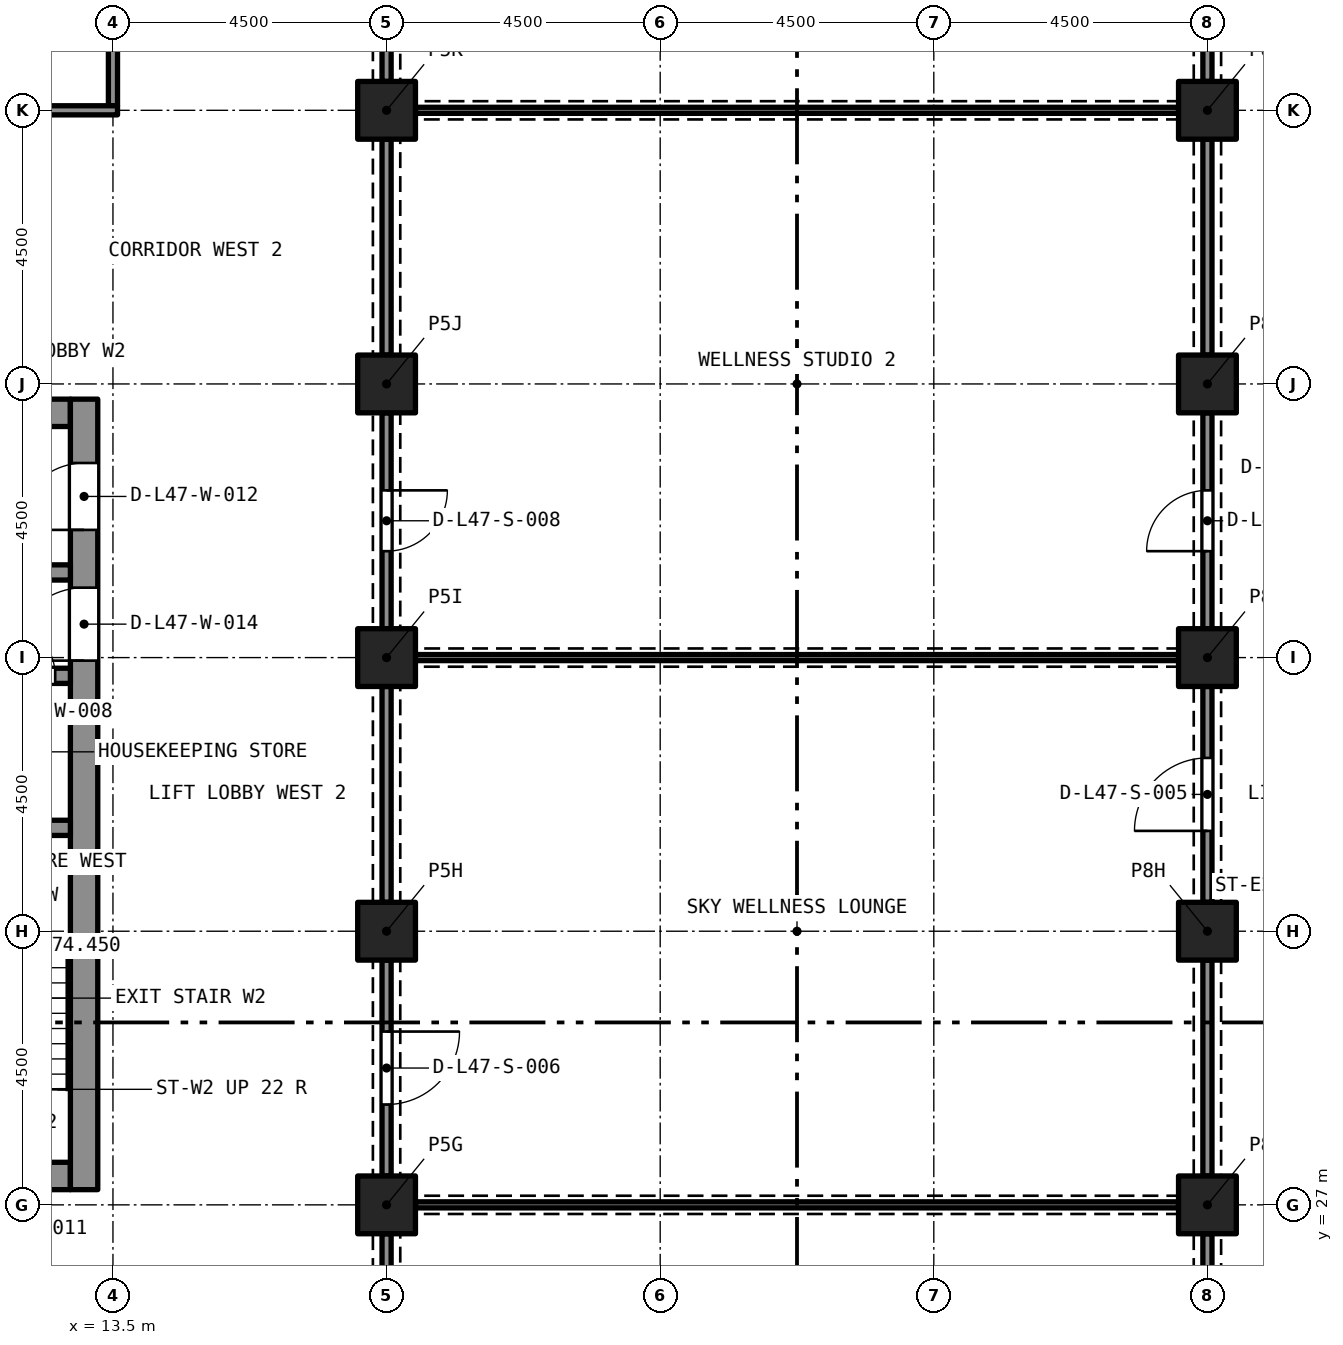
"""IFC4 building model, lengths in metres.
Left out: names, types, materials, properties, quantities, classifications, styles, units other than length and angle.
Written with IfcOpenShell. Run it as: python <this file> out.ifc"""

import sys

from ifc_helpers import new_model, si_unit, direction, frame, frame_2d, origin, origin_2d, place, context, subcontext, project, spatial, rectangle, extrude, element, fill, save


model = new_model("IFC4")
c1 = context("Model", 3, precision=1e-05, world=origin(), true_north=direction((0.0, 1.0)))
c2 = subcontext(c1, "Body", "Model", "MODEL_VIEW")
j1 = project(units=[si_unit("LENGTHUNIT", "METRE"), si_unit("PLANEANGLEUNIT", "RADIAN")], contexts=[c1])
p1 = place(None, origin())
s1 = spatial("IfcSite", under=j1, at=p1, CompositionType="ELEMENT")
p2 = place(p1, origin())
s2 = spatial("IfcBuilding", under=s1, at=p2, CompositionType="ELEMENT")
p3 = place(p2, frame((0.0, 0.0, 172.6)))
s3 = spatial("IfcBuildingStorey", under=s2, at=p3, CompositionType="ELEMENT", Elevation=172.6)
for number, where, z_axis, x_axis in (
    (1, (18.0, 27.0, 0.0), (0.0, 0.0, 1.0), (1.0, 0.0, 0.0)),
    (2, (31.5, 27.0, 0.0), (0.0, 0.0, 1.0), (1.0, 0.0, 0.0)),
    (3, (18.0, 31.5, 0.0), (0.0, 0.0, 1.0), (1.0, 0.0, 0.0)),
    (4, (31.5, 31.5, 0.0), (0.0, 0.0, 1.0), (1.0, 0.0, 0.0)),
    (5, (18.0, 36.0, 0.0), (0.0, 0.0, 1.0), (1.0, 0.0, 0.0)),
    (6, (31.5, 36.0, 0.0), (0.0, 0.0, 1.0), (1.0, 0.0, 0.0)),
    (7, (18.0, 40.5, 0.0), (0.0, 0.0, 1.0), (1.0, 0.0, 0.0)),
    (8, (31.5, 40.5, 0.0), (0.0, 0.0, 1.0), (1.0, 0.0, 0.0)),
    (9, (18.0, 45.0, 0.0), (0.0, 0.0, 1.0), (1.0, 0.0, 0.0)),
    (10, (31.5, 45.0, 0.0), (0.0, 0.0, 1.0), (1.0, 0.0, 0.0)),
):
    element("IfcColumn", number, at=place(p3, frame(where, z_axis=z_axis, x_axis=x_axis)), inside=s3, PredefinedType="COLUMN", context=c2, shape_type="SweptSolid", body=[
        extrude(rectangle(XDim=0.95, YDim=0.95, at=origin_2d()), origin(), (0.0, 0.0, 1.0), 3.7),
    ])
p4 = place(p3, frame((5.2, 27.475, 0.0), z_axis=(0.0, 0.0, 1.0), x_axis=(1.0, 0.0, 0.0)))
e11 = element("IfcWall", 11, at=p4, inside=s3, PredefinedType="SOLIDWALL", context=c2, shape_type="SweptSolid", body=[
    extrude(rectangle(XDim=7.6, YDim=0.45, at=frame_2d((3.8, 0.0))), origin(), (0.0, 0.0, 1.0), 3.7),
])
p5 = place(p4, frame((0.725, 0.0, 0.0)))
e12 = element("IfcOpeningElement", 12, at=p5, cuts=e11, PredefinedType="OPENING", context=c2, shape_type="SweptSolid", body=[
    extrude(rectangle(XDim=1.1, YDim=2.1, at=frame_2d((0.55, 1.05))), frame((0.0, 0.235, 0.0), z_axis=(0.0, -1.0, 0.0), x_axis=(1.0, 0.0, 0.0)), (0.0, 0.0, 1.0), 0.47),
])
p6 = place(p4, frame((3.25, 0.0, 0.0)))
e13 = element("IfcOpeningElement", 13, at=p6, cuts=e11, PredefinedType="OPENING", context=c2, shape_type="SweptSolid", body=[
    extrude(rectangle(XDim=1.1, YDim=2.1, at=frame_2d((0.55, 1.05))), frame((0.0, 0.235, 0.0), z_axis=(0.0, -1.0, 0.0), x_axis=(1.0, 0.0, 0.0)), (0.0, 0.0, 1.0), 0.47),
])
p7 = place(p4, frame((5.775, 0.0, 0.0)))
e14 = element("IfcOpeningElement", 14, at=p7, cuts=e11, PredefinedType="OPENING", context=c2, shape_type="SweptSolid", body=[
    extrude(rectangle(XDim=1.1, YDim=2.1, at=frame_2d((0.55, 1.05))), frame((0.0, 0.235, 0.0), z_axis=(0.0, -1.0, 0.0), x_axis=(1.0, 0.0, 0.0)), (0.0, 0.0, 1.0), 0.47),
])
p8 = place(p3, frame((5.2, 40.025, 0.0), z_axis=(0.0, 0.0, 1.0), x_axis=(1.0, 0.0, 0.0)))
e15 = element("IfcWall", 15, at=p8, inside=s3, PredefinedType="SOLIDWALL", context=c2, shape_type="SweptSolid", body=[
    extrude(rectangle(XDim=7.6, YDim=0.45, at=frame_2d((3.8, 0.0))), origin(), (0.0, 0.0, 1.0), 3.7),
])
p9 = place(p3, frame((13.025, 27.25, 0.0), z_axis=(0.0, 0.0, 1.0), x_axis=(0.0, 1.0, 0.0)))
e16 = element("IfcWall", 16, at=p9, inside=s3, PredefinedType="SOLIDWALL", context=c2, shape_type="SweptSolid", body=[
    extrude(rectangle(XDim=13.0, YDim=0.45, at=frame_2d((6.5, 0.0))), origin(), (0.0, 0.0, 1.0), 3.7),
])
p10 = place(p9, frame((10.85, 0.0, 0.0)))
e17 = element("IfcOpeningElement", 17, at=p10, cuts=e16, PredefinedType="OPENING", context=c2, shape_type="SweptSolid", body=[
    extrude(rectangle(XDim=1.1, YDim=2.1, at=frame_2d((0.55, 1.05))), frame((0.0, 0.235, 0.0), z_axis=(0.0, -1.0, 0.0), x_axis=(1.0, 0.0, 0.0)), (0.0, 0.0, 1.0), 0.47),
])
p11 = place(p9, frame((8.7, 0.0, 0.0)))
e18 = element("IfcOpeningElement", 18, at=p11, cuts=e16, PredefinedType="OPENING", context=c2, shape_type="SweptSolid", body=[
    extrude(rectangle(XDim=1.2, YDim=2.1, at=frame_2d((0.6, 1.05))), frame((0.0, 0.235, 0.0), z_axis=(0.0, -1.0, 0.0), x_axis=(1.0, 0.0, 0.0)), (0.0, 0.0, 1.0), 0.47),
])
p12 = place(p3, frame((5.2, 33.2, 0.0), z_axis=(0.0, 0.0, 1.0), x_axis=(1.0, 0.0, 0.0)))
e19 = element("IfcWall", 19, at=p12, inside=s3, PredefinedType="SOLIDWALL", context=c2, shape_type="SweptSolid", body=[
    extrude(rectangle(XDim=7.6, YDim=0.25, at=frame_2d((3.8, 0.0))), origin(), (0.0, 0.0, 1.0), 3.4),
])
p13 = place(p12, frame((3.3, 0.0, 0.0)))
e20 = element("IfcOpeningElement", 20, at=p13, cuts=e19, PredefinedType="OPENING", context=c2, shape_type="SweptSolid", body=[
    extrude(rectangle(XDim=1.0, YDim=2.1, at=frame_2d((0.5, 1.05))), frame((0.0, 0.135, 0.0), z_axis=(0.0, -1.0, 0.0), x_axis=(1.0, 0.0, 0.0)), (0.0, 0.0, 1.0), 0.27),
])
p14 = place(p3, frame((5.2, 35.7, 0.0), z_axis=(0.0, 0.0, 1.0), x_axis=(1.0, 0.0, 0.0)))
e21 = element("IfcWall", 21, at=p14, inside=s3, PredefinedType="SOLIDWALL", context=c2, shape_type="SweptSolid", body=[
    extrude(rectangle(XDim=7.6, YDim=0.25, at=frame_2d((3.8, 0.0))), origin(), (0.0, 0.0, 1.0), 3.4),
])
p15 = place(p14, frame((0.725, 0.0, 0.0)))
e22 = element("IfcOpeningElement", 22, at=p15, cuts=e21, PredefinedType="OPENING", context=c2, shape_type="SweptSolid", body=[
    extrude(rectangle(XDim=1.1, YDim=2.4, at=frame_2d((0.55, 1.2))), frame((0.0, 0.135, 0.0), z_axis=(0.0, -1.0, 0.0), x_axis=(1.0, 0.0, 0.0)), (0.0, 0.0, 1.0), 0.27),
])
p16 = place(p14, frame((5.125, 0.0, 0.0)))
e23 = element("IfcOpeningElement", 23, at=p16, cuts=e21, PredefinedType="OPENING", context=c2, shape_type="SweptSolid", body=[
    extrude(rectangle(XDim=0.8, YDim=2.1, at=frame_2d((0.4, 1.05))), frame((0.0, 0.135, 0.0), z_axis=(0.0, -1.0, 0.0), x_axis=(1.0, 0.0, 0.0)), (0.0, 0.0, 1.0), 0.27),
])
p17 = place(p14, frame((6.45, 0.0, 0.0)))
e24 = element("IfcOpeningElement", 24, at=p17, cuts=e21, PredefinedType="OPENING", context=c2, shape_type="SweptSolid", body=[
    extrude(rectangle(XDim=0.9, YDim=2.1, at=frame_2d((0.45, 1.05))), frame((0.0, 0.135, 0.0), z_axis=(0.0, -1.0, 0.0), x_axis=(1.0, 0.0, 0.0)), (0.0, 0.0, 1.0), 0.27),
])
p18 = place(p3, frame((5.2, 37.4, 0.0), z_axis=(0.0, 0.0, 1.0), x_axis=(1.0, 0.0, 0.0)))
e25 = element("IfcWall", 25, at=p18, inside=s3, PredefinedType="SOLIDWALL", context=c2, shape_type="SweptSolid", body=[
    extrude(rectangle(XDim=7.6, YDim=0.25, at=frame_2d((3.8, 0.0))), origin(), (0.0, 0.0, 1.0), 3.4),
])
p19 = place(p18, frame((0.7, 0.0, 0.0)))
e26 = element("IfcOpeningElement", 26, at=p19, cuts=e25, PredefinedType="OPENING", context=c2, shape_type="SweptSolid", body=[
    extrude(rectangle(XDim=1.1, YDim=2.4, at=frame_2d((0.55, 1.2))), frame((0.0, 0.135, 0.0), z_axis=(0.0, -1.0, 0.0), x_axis=(1.0, 0.0, 0.0)), (0.0, 0.0, 1.0), 0.27),
])
p20 = place(p3, frame((18.475, 27.0, 0.0), z_axis=(0.0, 0.0, 1.0), x_axis=(1.0, 0.0, 0.0)))
e27 = element("IfcWall", 27, at=p20, inside=s3, PredefinedType="PARTITIONING", context=c2, shape_type="SweptSolid", body=[
    extrude(rectangle(XDim=12.55, YDim=0.1, at=frame_2d((6.275, 0.0))), origin(), (0.0, 0.0, 1.0), 3.25),
])
p21 = place(p3, frame((31.5, 22.975, 0.0), z_axis=(0.0, 0.0, 1.0), x_axis=(0.0, 1.0, 0.0)))
e28 = element("IfcWall", 28, at=p21, inside=s3, PredefinedType="PARTITIONING", context=c2, shape_type="SweptSolid", body=[
    extrude(rectangle(XDim=3.55, YDim=0.15, at=frame_2d((1.775, 0.0))), origin(), (0.0, 0.0, 1.0), 2.88),
])
p22 = place(p21, frame((1.275, 0.0, 0.0)))
e29 = element("IfcOpeningElement", 29, at=p22, cuts=e28, PredefinedType="OPENING", context=c2, shape_type="SweptSolid", body=[
    extrude(rectangle(XDim=1.0, YDim=2.1, at=frame_2d((0.5, 1.05))), frame((0.0, 0.085, 0.0), z_axis=(0.0, -1.0, 0.0), x_axis=(1.0, 0.0, 0.0)), (0.0, 0.0, 1.0), 0.17),
])
p23 = place(p3, frame((18.0, 26.525, 0.0), z_axis=(0.0, 0.0, 1.0), x_axis=(0.0, -1.0, 0.0)))
e30 = element("IfcWall", 30, at=p23, inside=s3, PredefinedType="PARTITIONING", context=c2, shape_type="SweptSolid", body=[
    extrude(rectangle(XDim=3.55, YDim=0.15, at=frame_2d((1.775, 0.0))), origin(), (0.0, 0.0, 1.0), 2.88),
])
p24 = place(p23, frame((1.275, 0.0, 0.0)))
e31 = element("IfcOpeningElement", 31, at=p24, cuts=e30, PredefinedType="OPENING", context=c2, shape_type="SweptSolid", body=[
    extrude(rectangle(XDim=1.0, YDim=2.1, at=frame_2d((0.5, 1.05))), frame((0.0, 0.085, 0.0), z_axis=(0.0, -1.0, 0.0), x_axis=(1.0, 0.0, 0.0)), (0.0, 0.0, 1.0), 0.17),
])
p25 = place(p3, frame((18.475, 36.0, 0.0), z_axis=(0.0, 0.0, 1.0), x_axis=(1.0, 0.0, 0.0)))
e32 = element("IfcWall", 32, at=p25, inside=s3, PredefinedType="PARTITIONING", context=c2, shape_type="SweptSolid", body=[
    extrude(rectangle(XDim=12.55, YDim=0.1, at=frame_2d((6.275, 0.0))), origin(), (0.0, 0.0, 1.0), 3.25),
])
p26 = place(p3, frame((31.5, 31.975, 0.0), z_axis=(0.0, 0.0, 1.0), x_axis=(0.0, 1.0, 0.0)))
e33 = element("IfcWall", 33, at=p26, inside=s3, PredefinedType="PARTITIONING", context=c2, shape_type="SweptSolid", body=[
    extrude(rectangle(XDim=3.55, YDim=0.15, at=frame_2d((1.775, 0.0))), origin(), (0.0, 0.0, 1.0), 2.88),
])
p27 = place(p26, frame((1.175, 0.0, 0.0)))
e34 = element("IfcOpeningElement", 34, at=p27, cuts=e33, PredefinedType="OPENING", context=c2, shape_type="SweptSolid", body=[
    extrude(rectangle(XDim=1.2, YDim=2.1, at=frame_2d((0.6, 1.05))), frame((0.0, 0.085, 0.0), z_axis=(0.0, -1.0, 0.0), x_axis=(1.0, 0.0, 0.0)), (0.0, 0.0, 1.0), 0.17),
])
p28 = place(p3, frame((31.5, 27.475, 0.0), z_axis=(0.0, 0.0, 1.0), x_axis=(0.0, 1.0, 0.0)))
e35 = element("IfcWall", 35, at=p28, inside=s3, PredefinedType="PARTITIONING", context=c2, shape_type="SweptSolid", body=[
    extrude(rectangle(XDim=3.55, YDim=0.15, at=frame_2d((1.775, 0.0))), origin(), (0.0, 0.0, 1.0), 2.88),
])
p29 = place(p3, frame((18.0, 31.025, 0.0), z_axis=(0.0, 0.0, 1.0), x_axis=(0.0, -1.0, 0.0)))
e36 = element("IfcWall", 36, at=p29, inside=s3, PredefinedType="PARTITIONING", context=c2, shape_type="SweptSolid", body=[
    extrude(rectangle(XDim=3.55, YDim=0.15, at=frame_2d((1.775, 0.0))), origin(), (0.0, 0.0, 1.0), 2.88),
])
p30 = place(p29, frame((1.175, 0.0, 0.0)))
e37 = element("IfcOpeningElement", 37, at=p30, cuts=e36, PredefinedType="OPENING", context=c2, shape_type="SweptSolid", body=[
    extrude(rectangle(XDim=1.2, YDim=2.1, at=frame_2d((0.6, 1.05))), frame((0.0, 0.085, 0.0), z_axis=(0.0, -1.0, 0.0), x_axis=(1.0, 0.0, 0.0)), (0.0, 0.0, 1.0), 0.17),
])
p31 = place(p3, frame((18.0, 31.975, 0.0), z_axis=(0.0, 0.0, 1.0), x_axis=(0.0, 1.0, 0.0)))
e38 = element("IfcWall", 38, at=p31, inside=s3, PredefinedType="PARTITIONING", context=c2, shape_type="SweptSolid", body=[
    extrude(rectangle(XDim=3.55, YDim=0.15, at=frame_2d((1.775, 0.0))), origin(), (0.0, 0.0, 1.0), 2.88),
])
p32 = place(p3, frame((18.475, 45.0, 0.0), z_axis=(0.0, 0.0, 1.0), x_axis=(1.0, 0.0, 0.0)))
e39 = element("IfcWall", 39, at=p32, inside=s3, PredefinedType="PARTITIONING", context=c2, shape_type="SweptSolid", body=[
    extrude(rectangle(XDim=12.55, YDim=0.1, at=frame_2d((6.275, 0.0))), origin(), (0.0, 0.0, 1.0), 3.25),
])
p33 = place(p3, frame((31.5, 36.475, 0.0), z_axis=(0.0, 0.0, 1.0), x_axis=(0.0, 1.0, 0.0)))
e40 = element("IfcWall", 40, at=p33, inside=s3, PredefinedType="PARTITIONING", context=c2, shape_type="SweptSolid", body=[
    extrude(rectangle(XDim=3.55, YDim=0.15, at=frame_2d((1.775, 0.0))), origin(), (0.0, 0.0, 1.0), 2.88),
])
p34 = place(p33, frame((1.275, 0.0, 0.0)))
e41 = element("IfcOpeningElement", 41, at=p34, cuts=e40, PredefinedType="OPENING", context=c2, shape_type="SweptSolid", body=[
    extrude(rectangle(XDim=1.0, YDim=2.1, at=frame_2d((0.5, 1.05))), frame((0.0, 0.085, 0.0), z_axis=(0.0, -1.0, 0.0), x_axis=(1.0, 0.0, 0.0)), (0.0, 0.0, 1.0), 0.17),
])
p35 = place(p3, frame((31.5, 40.975, 0.0), z_axis=(0.0, 0.0, 1.0), x_axis=(0.0, 1.0, 0.0)))
e42 = element("IfcWall", 42, at=p35, inside=s3, PredefinedType="PARTITIONING", context=c2, shape_type="SweptSolid", body=[
    extrude(rectangle(XDim=3.55, YDim=0.15, at=frame_2d((1.775, 0.0))), origin(), (0.0, 0.0, 1.0), 2.88),
])
p36 = place(p3, frame((18.0, 40.025, 0.0), z_axis=(0.0, 0.0, 1.0), x_axis=(0.0, -1.0, 0.0)))
e43 = element("IfcWall", 43, at=p36, inside=s3, PredefinedType="PARTITIONING", context=c2, shape_type="SweptSolid", body=[
    extrude(rectangle(XDim=3.55, YDim=0.15, at=frame_2d((1.775, 0.0))), origin(), (0.0, 0.0, 1.0), 2.88),
])
p37 = place(p36, frame((1.275, 0.0, 0.0)))
e44 = element("IfcOpeningElement", 44, at=p37, cuts=e43, PredefinedType="OPENING", context=c2, shape_type="SweptSolid", body=[
    extrude(rectangle(XDim=1.0, YDim=2.1, at=frame_2d((0.5, 1.05))), frame((0.0, 0.085, 0.0), z_axis=(0.0, -1.0, 0.0), x_axis=(1.0, 0.0, 0.0)), (0.0, 0.0, 1.0), 0.17),
])
for number, where, z_axis, x_axis in (
    (45, (18.0, 40.975, 0.0), (0.0, 0.0, 1.0), (0.0, 1.0, 0.0)),
    (46, (31.5, 45.475, 0.0), (0.0, 0.0, 1.0), (0.0, 1.0, 0.0)),
):
    element("IfcWall", number, at=place(p3, frame(where, z_axis=z_axis, x_axis=x_axis)), inside=s3, PredefinedType="PARTITIONING", context=c2, shape_type="SweptSolid", body=[
        extrude(rectangle(XDim=3.55, YDim=0.15, at=frame_2d((1.775, 0.0))), origin(), (0.0, 0.0, 1.0), 2.88),
    ])
p38 = place(p3, frame((18.0, 49.025, 0.0), z_axis=(0.0, 0.0, 1.0), x_axis=(0.0, -1.0, 0.0)))
e47 = element("IfcWall", 47, at=p38, inside=s3, PredefinedType="PARTITIONING", context=c2, shape_type="SweptSolid", body=[
    extrude(rectangle(XDim=3.55, YDim=0.15, at=frame_2d((1.775, 0.0))), origin(), (0.0, 0.0, 1.0), 2.88),
])
p39 = place(p38, frame((1.275, 0.0, 0.0)))
e48 = element("IfcOpeningElement", 48, at=p39, cuts=e47, PredefinedType="OPENING", context=c2, shape_type="SweptSolid", body=[
    extrude(rectangle(XDim=1.0, YDim=2.1, at=frame_2d((0.5, 1.05))), frame((0.0, 0.085, 0.0), z_axis=(0.0, -1.0, 0.0), x_axis=(1.0, 0.0, 0.0)), (0.0, 0.0, 1.0), 0.17),
])
p40 = place(p3, frame((13.5, 45.075, 0.0), z_axis=(0.0, 0.0, 1.0), x_axis=(0.0, 1.0, 0.0)))
e49 = element("IfcWall", 49, at=p40, inside=s3, PredefinedType="PARTITIONING", context=c2, shape_type="SweptSolid", body=[
    extrude(rectangle(XDim=3.95, YDim=0.15, at=frame_2d((1.975, 0.0))), origin(), (0.0, 0.0, 1.0), 3.4),
])
p41 = place(p3, frame((9.0, 45.0, 0.0), z_axis=(0.0, 0.0, 1.0), x_axis=(1.0, 0.0, 0.0)))
e50 = element("IfcWall", 50, at=p41, inside=s3, PredefinedType="PARTITIONING", context=c2, shape_type="SweptSolid", body=[
    extrude(rectangle(XDim=4.575, YDim=0.15, at=frame_2d((2.288, 0.0))), origin(), (0.0, 0.0, 1.0), 3.4),
])
p42 = place(p41, frame((1.85, 0.0, 0.0)))
e51 = element("IfcOpeningElement", 51, at=p42, cuts=e50, PredefinedType="OPENING", context=c2, shape_type="SweptSolid", body=[
    extrude(rectangle(XDim=0.8, YDim=2.1, at=frame_2d((0.4, 1.05))), frame((0.0, 0.085, 0.0), z_axis=(0.0, -1.0, 0.0), x_axis=(1.0, 0.0, 0.0)), (0.0, 0.0, 1.0), 0.17),
])
p43 = place(p17, origin())
e52 = element("IfcDoor", 52, at=p43, inside=s3, OperationType="SINGLE_SWING_LEFT", PredefinedType="DOOR", context=c2, shape_type="SweptSolid", body=[
    extrude(rectangle(XDim=0.9, YDim=2.1, at=frame_2d((0.45, 1.05))), frame((0.0, 0.025, 0.0), z_axis=(0.0, -1.0, 0.0), x_axis=(1.0, 0.0, 0.0)), (0.0, 0.0, 1.0), 0.05),
])
fill(e24, e52)
p44 = place(p10, origin())
e53 = element("IfcDoor", 53, at=p44, inside=s3, OperationType="SINGLE_SWING_LEFT", PredefinedType="DOOR", context=c2, shape_type="SweptSolid", body=[
    extrude(rectangle(XDim=1.1, YDim=2.1, at=frame_2d((0.55, 1.05))), frame((0.0, 0.025, 0.0), z_axis=(0.0, -1.0, 0.0), x_axis=(1.0, 0.0, 0.0)), (0.0, 0.0, 1.0), 0.05),
])
fill(e17, e53)
p45 = place(p11, origin())
e54 = element("IfcDoor", 54, at=p45, inside=s3, OperationType="SINGLE_SWING_LEFT", PredefinedType="DOOR", context=c2, shape_type="SweptSolid", body=[
    extrude(rectangle(XDim=1.2, YDim=2.1, at=frame_2d((0.6, 1.05))), frame((0.0, 0.025, 0.0), z_axis=(0.0, -1.0, 0.0), x_axis=(1.0, 0.0, 0.0)), (0.0, 0.0, 1.0), 0.05),
])
fill(e18, e54)
p46 = place(p27, origin())
e55 = element("IfcDoor", 55, at=p46, inside=s3, OperationType="SINGLE_SWING_LEFT", PredefinedType="DOOR", context=c2, shape_type="SweptSolid", body=[
    extrude(rectangle(XDim=1.2, YDim=2.1, at=frame_2d((0.6, 1.05))), frame((0.0, 0.025, 0.0), z_axis=(0.0, -1.0, 0.0), x_axis=(1.0, 0.0, 0.0)), (0.0, 0.0, 1.0), 0.05),
])
fill(e34, e55)
p47 = place(p30, origin())
e56 = element("IfcDoor", 56, at=p47, inside=s3, OperationType="SINGLE_SWING_LEFT", PredefinedType="DOOR", context=c2, shape_type="SweptSolid", body=[
    extrude(rectangle(XDim=1.2, YDim=2.1, at=frame_2d((0.6, 1.05))), frame((0.0, 0.025, 0.0), z_axis=(0.0, -1.0, 0.0), x_axis=(1.0, 0.0, 0.0)), (0.0, 0.0, 1.0), 0.05),
])
fill(e37, e56)
p48 = place(p34, origin())
e57 = element("IfcDoor", 57, at=p48, inside=s3, OperationType="SINGLE_SWING_RIGHT", PredefinedType="DOOR", context=c2, shape_type="SweptSolid", body=[
    extrude(rectangle(XDim=1.0, YDim=2.1, at=frame_2d((0.5, 1.05))), frame((0.0, 0.025, 0.0), z_axis=(0.0, -1.0, 0.0), x_axis=(1.0, 0.0, 0.0)), (0.0, 0.0, 1.0), 0.05),
])
fill(e41, e57)
p49 = place(p37, origin())
e58 = element("IfcDoor", 58, at=p49, inside=s3, OperationType="SINGLE_SWING_RIGHT", PredefinedType="DOOR", context=c2, shape_type="SweptSolid", body=[
    extrude(rectangle(XDim=1.0, YDim=2.1, at=frame_2d((0.5, 1.05))), frame((0.0, 0.025, 0.0), z_axis=(0.0, -1.0, 0.0), x_axis=(1.0, 0.0, 0.0)), (0.0, 0.0, 1.0), 0.05),
])
fill(e44, e58)
save(model, sys.argv[1])
